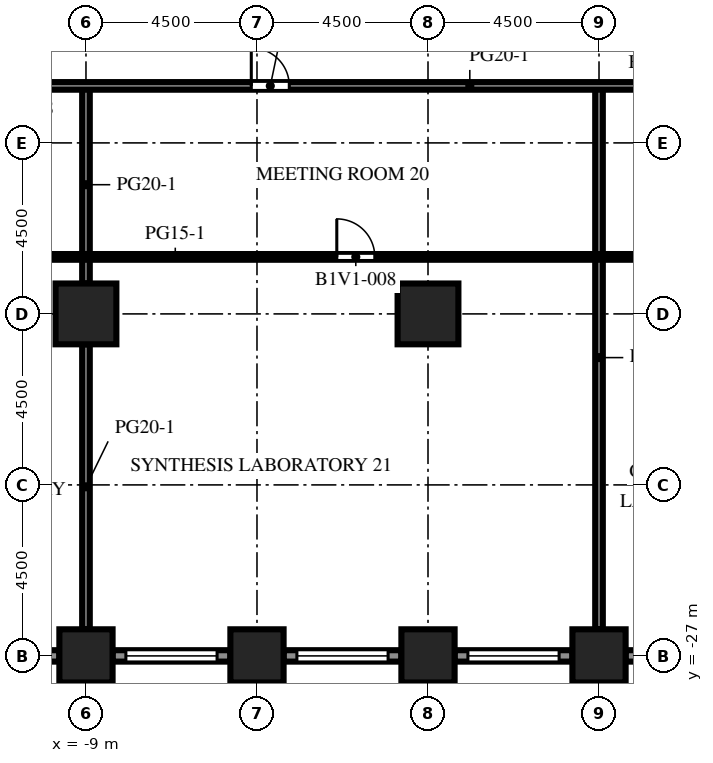
"""IFC4 building model, lengths in metres.
Left out: names, types, materials, properties, quantities, classifications, styles, units other than length and angle.
Written with IfcOpenShell. Run it as: python <this file> out.ifc"""

import sys

from ifc_helpers import new_model, si_unit, direction, frame, frame_2d, origin, origin_2d, place, context, subcontext, project, spatial, rectangle, extrude, element, fill, save


model = new_model("IFC4")
c1 = context("Model", 3, precision=1e-05, world=origin(), true_north=direction((0.0, 1.0)))
c2 = subcontext(c1, "Body", "Model", "MODEL_VIEW")
j1 = project(units=[si_unit("LENGTHUNIT", "METRE"), si_unit("PLANEANGLEUNIT", "RADIAN")], contexts=[c1])
p1 = place(None, origin())
s1 = spatial("IfcSite", under=j1, at=p1, CompositionType="ELEMENT")
p2 = place(p1, origin())
s2 = spatial("IfcBuilding", under=s1, at=p2, CompositionType="ELEMENT")
p3 = place(p2, frame((0.0, 0.0, 27.7)))
s3 = spatial("IfcBuildingStorey", under=s2, at=p3, CompositionType="ELEMENT", Elevation=27.7)
for number, where, z_axis, x_axis in (
    (1, (-9.0, -27.0, 0.0), (0.0, 0.0, 1.0), (1.0, 0.0, 0.0)),
    (2, (-4.5, -27.0, 0.0), (0.0, 0.0, 1.0), (1.0, 0.0, 0.0)),
    (3, (0.0, -27.0, 0.0), (0.0, 0.0, 1.0), (1.0, 0.0, 0.0)),
    (4, (4.5, -27.0, 0.0), (0.0, 0.0, 1.0), (1.0, 0.0, 0.0)),
):
    element("IfcColumn", number, at=place(p3, frame(where, z_axis=z_axis, x_axis=x_axis)), inside=s3, PredefinedType="COLUMN", context=c2, shape_type="SweptSolid", body=[
        extrude(rectangle(XDim=1.4, YDim=1.4, at=origin_2d()), origin(), (0.0, 0.0, 1.0), 4.1),
    ])
for number, where, z_axis, x_axis in (
    (5, (-9.0, -18.0, 0.0), (0.0, 0.0, 1.0), (1.0, 0.0, 0.0)),
    (6, (0.0, -18.0, 0.0), (0.0, 0.0, 1.0), (1.0, 0.0, 0.0)),
):
    element("IfcColumn", number, at=place(p3, frame(where, z_axis=z_axis, x_axis=x_axis)), inside=s3, PredefinedType="COLUMN", context=c2, shape_type="SweptSolid", body=[
        extrude(rectangle(XDim=1.6, YDim=1.6, at=origin_2d()), origin(), (0.0, 0.0, 1.0), 4.1),
    ])
p4 = place(p3, frame((-9.7, -27.0, 0.0), z_axis=(0.0, 0.0, 1.0), x_axis=(-1.0, 0.0, 0.0)))
e7 = element("IfcWall", 7, at=p4, inside=s3, PredefinedType="SOLIDWALL", context=c2, shape_type="SweptSolid", body=[
    extrude(rectangle(XDim=3.1, YDim=0.3, at=frame_2d((1.55, 0.0))), origin(), (0.0, 0.0, 1.0), 2.75),
])
p5 = place(p4, frame((0.35, 0.0, 0.8)))
e8 = element("IfcOpeningElement", 8, at=p5, cuts=e7, PredefinedType="OPENING", context=c2, shape_type="SweptSolid", body=[
    extrude(rectangle(XDim=2.4, YDim=1.7, at=frame_2d((1.2, 0.85))), frame((0.0, 0.16, 0.0), z_axis=(0.0, -1.0, 0.0), x_axis=(1.0, 0.0, 0.0)), (0.0, 0.0, 1.0), 0.32),
])
p6 = place(p3, frame((-5.2, -27.0, 0.0), z_axis=(0.0, 0.0, 1.0), x_axis=(-1.0, 0.0, 0.0)))
e9 = element("IfcWall", 9, at=p6, inside=s3, PredefinedType="SOLIDWALL", context=c2, shape_type="SweptSolid", body=[
    extrude(rectangle(XDim=3.1, YDim=0.3, at=frame_2d((1.55, 0.0))), origin(), (0.0, 0.0, 1.0), 2.75),
])
p7 = place(p6, frame((0.35, 0.0, 0.8)))
e10 = element("IfcOpeningElement", 10, at=p7, cuts=e9, PredefinedType="OPENING", context=c2, shape_type="SweptSolid", body=[
    extrude(rectangle(XDim=2.4, YDim=1.7, at=frame_2d((1.2, 0.85))), frame((0.0, 0.16, 0.0), z_axis=(0.0, -1.0, 0.0), x_axis=(1.0, 0.0, 0.0)), (0.0, 0.0, 1.0), 0.32),
])
p8 = place(p3, frame((-0.7, -27.0, 0.0), z_axis=(0.0, 0.0, 1.0), x_axis=(-1.0, 0.0, 0.0)))
e11 = element("IfcWall", 11, at=p8, inside=s3, PredefinedType="SOLIDWALL", context=c2, shape_type="SweptSolid", body=[
    extrude(rectangle(XDim=3.1, YDim=0.3, at=frame_2d((1.55, 0.0))), origin(), (0.0, 0.0, 1.0), 2.75),
])
p9 = place(p8, frame((0.35, 0.0, 0.8)))
e12 = element("IfcOpeningElement", 12, at=p9, cuts=e11, PredefinedType="OPENING", context=c2, shape_type="SweptSolid", body=[
    extrude(rectangle(XDim=2.4, YDim=1.7, at=frame_2d((1.2, 0.85))), frame((0.0, 0.16, 0.0), z_axis=(0.0, -1.0, 0.0), x_axis=(1.0, 0.0, 0.0)), (0.0, 0.0, 1.0), 0.32),
])
p10 = place(p3, frame((3.8, -27.0, 0.0), z_axis=(0.0, 0.0, 1.0), x_axis=(-1.0, 0.0, 0.0)))
e13 = element("IfcWall", 13, at=p10, inside=s3, PredefinedType="SOLIDWALL", context=c2, shape_type="SweptSolid", body=[
    extrude(rectangle(XDim=3.1, YDim=0.3, at=frame_2d((1.55, 0.0))), origin(), (0.0, 0.0, 1.0), 2.75),
])
p11 = place(p10, frame((0.35, 0.0, 0.8)))
e14 = element("IfcOpeningElement", 14, at=p11, cuts=e13, PredefinedType="OPENING", context=c2, shape_type="SweptSolid", body=[
    extrude(rectangle(XDim=2.4, YDim=1.7, at=frame_2d((1.2, 0.85))), frame((0.0, 0.16, 0.0), z_axis=(0.0, -1.0, 0.0), x_axis=(1.0, 0.0, 0.0)), (0.0, 0.0, 1.0), 0.32),
])
p12 = place(p3, frame((8.3, -27.0, 0.0), z_axis=(0.0, 0.0, 1.0), x_axis=(-1.0, 0.0, 0.0)))
e15 = element("IfcWall", 15, at=p12, inside=s3, PredefinedType="SOLIDWALL", context=c2, shape_type="SweptSolid", body=[
    extrude(rectangle(XDim=3.1, YDim=0.3, at=frame_2d((1.55, 0.0))), origin(), (0.0, 0.0, 1.0), 2.75),
])
p13 = place(p12, frame((0.35, 0.0, 0.8)))
e16 = element("IfcOpeningElement", 16, at=p13, cuts=e15, PredefinedType="OPENING", context=c2, shape_type="SweptSolid", body=[
    extrude(rectangle(XDim=2.4, YDim=1.7, at=frame_2d((1.2, 0.85))), frame((0.0, 0.16, 0.0), z_axis=(0.0, -1.0, 0.0), x_axis=(1.0, 0.0, 0.0)), (0.0, 0.0, 1.0), 0.32),
])
p14 = place(p3, frame((-9.0, -26.3, 0.0), z_axis=(0.0, 0.0, 1.0), x_axis=(0.0, 1.0, 0.0)))
e17 = element("IfcWall", 17, at=p14, inside=s3, PredefinedType="PARTITIONING", context=c2, shape_type="SweptSolid", body=[
    extrude(rectangle(XDim=7.5, YDim=0.2, at=frame_2d((3.75, 0.0))), origin(), (0.0, 0.0, 1.0), 3.65),
])
p15 = place(p3, frame((-9.0, -17.2, 0.0), z_axis=(0.0, 0.0, 1.0), x_axis=(0.0, 1.0, 0.0)))
e18 = element("IfcWall", 18, at=p15, inside=s3, PredefinedType="PARTITIONING", context=c2, shape_type="SweptSolid", body=[
    extrude(rectangle(XDim=5.2, YDim=0.2, at=frame_2d((2.6, 0.0))), origin(), (0.0, 0.0, 1.0), 3.65),
])
p16 = place(p3, frame((4.5, -26.3, 0.0), z_axis=(0.0, 0.0, 1.0), x_axis=(0.0, 1.0, 0.0)))
e19 = element("IfcWall", 19, at=p16, inside=s3, PredefinedType="PARTITIONING", context=c2, shape_type="SweptSolid", body=[
    extrude(rectangle(XDim=14.3, YDim=0.2, at=frame_2d((7.15, 0.0))), origin(), (0.0, 0.0, 1.0), 3.65),
])
p17 = place(p3, frame((26.85, -16.5, 0.0), z_axis=(0.0, 0.0, 1.0), x_axis=(-1.0, 0.0, 0.0)))
e20 = element("IfcWall", 20, at=p17, inside=s3, PredefinedType="PARTITIONING", context=c2, shape_type="SweptSolid", body=[
    extrude(rectangle(XDim=53.7, YDim=0.15, at=frame_2d((26.85, 0.0))), origin(), (0.0, 0.0, 1.0), 3.65),
])
p18 = place(p17, frame((50.75, 0.0, 0.0)))
e21 = element("IfcOpeningElement", 21, at=p18, cuts=e20, PredefinedType="OPENING", context=c2, shape_type="SweptSolid", body=[
    extrude(rectangle(XDim=1.0, YDim=2.1, at=frame_2d((0.5, 1.05))), frame((0.0, 0.085, 0.0), z_axis=(0.0, -1.0, 0.0), x_axis=(1.0, 0.0, 0.0)), (0.0, 0.0, 1.0), 0.17),
])
p19 = place(p17, frame((45.75, 0.0, 0.0)))
e22 = element("IfcOpeningElement", 22, at=p19, cuts=e20, PredefinedType="OPENING", context=c2, shape_type="SweptSolid", body=[
    extrude(rectangle(XDim=1.0, YDim=2.1, at=frame_2d((0.5, 1.05))), frame((0.0, 0.085, 0.0), z_axis=(0.0, -1.0, 0.0), x_axis=(1.0, 0.0, 0.0)), (0.0, 0.0, 1.0), 0.17),
])
p20 = place(p17, frame((37.75, 0.0, 0.0)))
e23 = element("IfcOpeningElement", 23, at=p20, cuts=e20, PredefinedType="OPENING", context=c2, shape_type="SweptSolid", body=[
    extrude(rectangle(XDim=1.0, YDim=2.1, at=frame_2d((0.5, 1.05))), frame((0.0, 0.085, 0.0), z_axis=(0.0, -1.0, 0.0), x_axis=(1.0, 0.0, 0.0)), (0.0, 0.0, 1.0), 0.17),
])
p21 = place(p17, frame((28.25, 0.0, 0.0)))
e24 = element("IfcOpeningElement", 24, at=p21, cuts=e20, PredefinedType="OPENING", context=c2, shape_type="SweptSolid", body=[
    extrude(rectangle(XDim=1.0, YDim=2.1, at=frame_2d((0.5, 1.05))), frame((0.0, 0.085, 0.0), z_axis=(0.0, -1.0, 0.0), x_axis=(1.0, 0.0, 0.0)), (0.0, 0.0, 1.0), 0.17),
])
p22 = place(p17, frame((19.75, 0.0, 0.0)))
e25 = element("IfcOpeningElement", 25, at=p22, cuts=e20, PredefinedType="OPENING", context=c2, shape_type="SweptSolid", body=[
    extrude(rectangle(XDim=1.0, YDim=2.1, at=frame_2d((0.5, 1.05))), frame((0.0, 0.085, 0.0), z_axis=(0.0, -1.0, 0.0), x_axis=(1.0, 0.0, 0.0)), (0.0, 0.0, 1.0), 0.17),
])
p23 = place(p17, frame((13.5, 0.0, 0.0)))
e26 = element("IfcOpeningElement", 26, at=p23, cuts=e20, PredefinedType="OPENING", context=c2, shape_type="SweptSolid", body=[
    extrude(rectangle(XDim=1.0, YDim=2.1, at=frame_2d((0.5, 1.05))), frame((0.0, 0.085, 0.0), z_axis=(0.0, -1.0, 0.0), x_axis=(1.0, 0.0, 0.0)), (0.0, 0.0, 1.0), 0.17),
])
p24 = place(p17, frame((6.75, 0.0, 0.0)))
e27 = element("IfcOpeningElement", 27, at=p24, cuts=e20, PredefinedType="OPENING", context=c2, shape_type="SweptSolid", body=[
    extrude(rectangle(XDim=1.0, YDim=2.1, at=frame_2d((0.5, 1.05))), frame((0.0, 0.085, 0.0), z_axis=(0.0, -1.0, 0.0), x_axis=(1.0, 0.0, 0.0)), (0.0, 0.0, 1.0), 0.17),
])
p25 = place(p17, frame((1.25, 0.0, 0.0)))
e28 = element("IfcOpeningElement", 28, at=p25, cuts=e20, PredefinedType="OPENING", context=c2, shape_type="SweptSolid", body=[
    extrude(rectangle(XDim=1.0, YDim=2.1, at=frame_2d((0.5, 1.05))), frame((0.0, 0.085, 0.0), z_axis=(0.0, -1.0, 0.0), x_axis=(1.0, 0.0, 0.0)), (0.0, 0.0, 1.0), 0.17),
])
p26 = place(p3, frame((26.85, -12.0, 0.0), z_axis=(0.0, 0.0, 1.0), x_axis=(-1.0, 0.0, 0.0)))
e29 = element("IfcWall", 29, at=p26, inside=s3, PredefinedType="PARTITIONING", context=c2, shape_type="SweptSolid", body=[
    extrude(rectangle(XDim=53.7, YDim=0.2, at=frame_2d((26.85, 0.0))), origin(), (0.0, 0.0, 1.0), 3.65),
])
p27 = place(p26, frame((51.5, 0.0, 0.0)))
e30 = element("IfcOpeningElement", 30, at=p27, cuts=e29, PredefinedType="OPENING", context=c2, shape_type="SweptSolid", body=[
    extrude(rectangle(XDim=1.0, YDim=2.1, at=frame_2d((0.5, 1.05))), frame((0.0, 0.11, 0.0), z_axis=(0.0, -1.0, 0.0), x_axis=(1.0, 0.0, 0.0)), (0.0, 0.0, 1.0), 0.22),
])
p28 = place(p26, frame((44.0, 0.0, 0.0)))
e31 = element("IfcOpeningElement", 31, at=p28, cuts=e29, PredefinedType="OPENING", context=c2, shape_type="SweptSolid", body=[
    extrude(rectangle(XDim=1.0, YDim=2.1, at=frame_2d((0.5, 1.05))), frame((0.0, 0.11, 0.0), z_axis=(0.0, -1.0, 0.0), x_axis=(1.0, 0.0, 0.0)), (0.0, 0.0, 1.0), 0.22),
])
p29 = place(p26, frame((37.25, 0.0, 0.0)))
e32 = element("IfcOpeningElement", 32, at=p29, cuts=e29, PredefinedType="OPENING", context=c2, shape_type="SweptSolid", body=[
    extrude(rectangle(XDim=1.0, YDim=2.1, at=frame_2d((0.5, 1.05))), frame((0.0, 0.11, 0.0), z_axis=(0.0, -1.0, 0.0), x_axis=(1.0, 0.0, 0.0)), (0.0, 0.0, 1.0), 0.22),
])
p30 = place(p26, frame((30.5, 0.0, 0.0)))
e33 = element("IfcOpeningElement", 33, at=p30, cuts=e29, PredefinedType="OPENING", context=c2, shape_type="SweptSolid", body=[
    extrude(rectangle(XDim=1.0, YDim=2.1, at=frame_2d((0.5, 1.05))), frame((0.0, 0.11, 0.0), z_axis=(0.0, -1.0, 0.0), x_axis=(1.0, 0.0, 0.0)), (0.0, 0.0, 1.0), 0.22),
])
p31 = place(p26, frame((20.0, 0.0, 0.0)))
e34 = element("IfcOpeningElement", 34, at=p31, cuts=e29, PredefinedType="OPENING", context=c2, shape_type="SweptSolid", body=[
    extrude(rectangle(XDim=1.0, YDim=2.1, at=frame_2d((0.5, 1.05))), frame((0.0, 0.11, 0.0), z_axis=(0.0, -1.0, 0.0), x_axis=(1.0, 0.0, 0.0)), (0.0, 0.0, 1.0), 0.22),
])
p32 = place(p26, frame((13.0, 0.0, 0.0)))
e35 = element("IfcOpeningElement", 35, at=p32, cuts=e29, PredefinedType="OPENING", context=c2, shape_type="SweptSolid", body=[
    extrude(rectangle(XDim=1.0, YDim=2.1, at=frame_2d((0.5, 1.05))), frame((0.0, 0.11, 0.0), z_axis=(0.0, -1.0, 0.0), x_axis=(1.0, 0.0, 0.0)), (0.0, 0.0, 1.0), 0.22),
])
p33 = place(p26, frame((5.75, 0.0, 0.0)))
e36 = element("IfcOpeningElement", 36, at=p33, cuts=e29, PredefinedType="OPENING", context=c2, shape_type="SweptSolid", body=[
    extrude(rectangle(XDim=1.0, YDim=2.1, at=frame_2d((0.5, 1.05))), frame((0.0, 0.11, 0.0), z_axis=(0.0, -1.0, 0.0), x_axis=(1.0, 0.0, 0.0)), (0.0, 0.0, 1.0), 0.22),
])
p34 = place(p26, frame((1.25, 0.0, 0.0)))
e37 = element("IfcOpeningElement", 37, at=p34, cuts=e29, PredefinedType="OPENING", context=c2, shape_type="SweptSolid", body=[
    extrude(rectangle(XDim=1.0, YDim=2.1, at=frame_2d((0.5, 1.05))), frame((0.0, 0.11, 0.0), z_axis=(0.0, -1.0, 0.0), x_axis=(1.0, 0.0, 0.0)), (0.0, 0.0, 1.0), 0.22),
])
p35 = place(p7, origin())
e38 = element("IfcWindow", 38, at=p35, inside=s3, PartitioningType="SINGLE_PANEL", PredefinedType="WINDOW", context=c2, shape_type="SweptSolid", body=[
    extrude(rectangle(XDim=2.4, YDim=1.7, at=frame_2d((1.2, 0.85))), frame((0.0, 0.03, 0.0), z_axis=(0.0, -1.0, 0.0), x_axis=(1.0, 0.0, 0.0)), (0.0, 0.0, 1.0), 0.06),
])
fill(e10, e38)
p36 = place(p9, origin())
e39 = element("IfcWindow", 39, at=p36, inside=s3, PartitioningType="SINGLE_PANEL", PredefinedType="WINDOW", context=c2, shape_type="SweptSolid", body=[
    extrude(rectangle(XDim=2.4, YDim=1.7, at=frame_2d((1.2, 0.85))), frame((0.0, 0.03, 0.0), z_axis=(0.0, -1.0, 0.0), x_axis=(1.0, 0.0, 0.0)), (0.0, 0.0, 1.0), 0.06),
])
fill(e12, e39)
p37 = place(p11, origin())
e40 = element("IfcWindow", 40, at=p37, inside=s3, PartitioningType="SINGLE_PANEL", PredefinedType="WINDOW", context=c2, shape_type="SweptSolid", body=[
    extrude(rectangle(XDim=2.4, YDim=1.7, at=frame_2d((1.2, 0.85))), frame((0.0, 0.03, 0.0), z_axis=(0.0, -1.0, 0.0), x_axis=(1.0, 0.0, 0.0)), (0.0, 0.0, 1.0), 0.06),
])
fill(e14, e40)
p38 = place(p21, origin())
e41 = element("IfcDoor", 41, at=p38, inside=s3, OperationType="SINGLE_SWING_RIGHT", PredefinedType="DOOR", context=c2, shape_type="SweptSolid", body=[
    extrude(rectangle(XDim=1.0, YDim=2.1, at=frame_2d((0.5, 1.05))), frame((0.0, 0.025, 0.0), z_axis=(0.0, -1.0, 0.0), x_axis=(1.0, 0.0, 0.0)), (0.0, 0.0, 1.0), 0.05),
])
fill(e24, e41)
p39 = place(p30, origin())
e42 = element("IfcDoor", 42, at=p39, inside=s3, OperationType="SINGLE_SWING_RIGHT", PredefinedType="DOOR", context=c2, shape_type="SweptSolid", body=[
    extrude(rectangle(XDim=1.0, YDim=2.1, at=frame_2d((0.5, 1.05))), frame((0.0, 0.025, 0.0), z_axis=(0.0, -1.0, 0.0), x_axis=(1.0, 0.0, 0.0)), (0.0, 0.0, 1.0), 0.05),
])
fill(e33, e42)
save(model, sys.argv[1])
